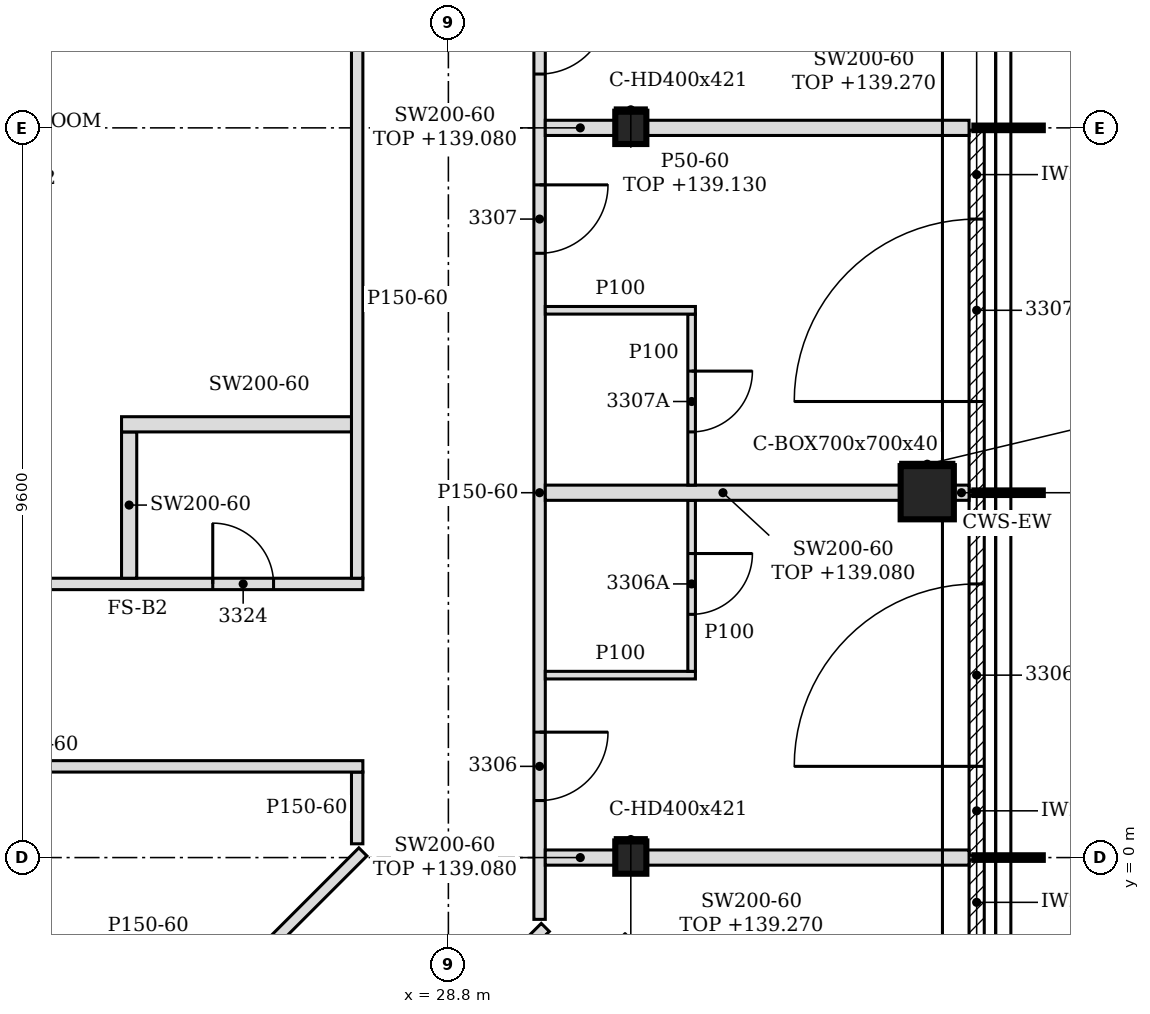
"""IFC4 building model, lengths in metres.
Left out: names, types, materials, properties, quantities, classifications, styles, units other than length and angle.
Written with IfcOpenShell. Run it as: python <this file> out.ifc"""

import sys

from ifc_helpers import new_model, si_unit, direction, frame, frame_2d, origin, origin_2d, place, context, subcontext, project, spatial, polyline, rectangle, hollow_rectangle, i_section, outline, extrude, element, fill, save


model = new_model("IFC4")
c1 = context("Model", 3, precision=1e-05, world=origin(), true_north=direction((0.0, 1.0)))
c2 = subcontext(c1, "Body", "Model", "MODEL_VIEW")
j1 = project(units=[si_unit("LENGTHUNIT", "METRE"), si_unit("PLANEANGLEUNIT", "RADIAN")], contexts=[c1])
p1 = place(None, origin())
s1 = spatial("IfcSite", under=j1, at=p1, CompositionType="ELEMENT")
p2 = place(p1, origin())
s2 = spatial("IfcBuilding", under=s1, at=p2, CompositionType="ELEMENT")
p3 = place(p2, frame((0.0, 0.0, 136.2)))
s3 = spatial("IfcBuildingStorey", under=s2, at=p3, CompositionType="ELEMENT", Elevation=136.2)
p4 = place(p3, frame((35.1, 4.8, -0.15), z_axis=(0.0, 0.0, 1.0), x_axis=(1.0, 0.0, 0.0)))
e1 = element("IfcColumn", 1, at=p4, inside=s3, PredefinedType="COLUMN", context=c2, shape_type="SweptSolid", body=[
    extrude(hollow_rectangle(XDim=0.7, YDim=0.7, WallThickness=0.04, at=origin_2d()), origin(), (0.0, 0.0, 1.0), 3.6),
])
for number, where, z_axis, x_axis in (
    (2, (31.2, 0.0, -0.15), (0.0, 0.0, 1.0), (1.0, 0.0, 0.0)),
    (3, (31.2, 9.6, -0.15), (0.0, 0.0, 1.0), (1.0, 0.0, 0.0)),
):
    element("IfcColumn", number, at=place(p3, frame(where, z_axis=z_axis, x_axis=x_axis)), inside=s3, PredefinedType="COLUMN", context=c2, shape_type="SweptSolid", body=[
        extrude(i_section(OverallWidth=0.409, OverallDepth=0.425, WebThickness=0.033, FlangeThickness=0.052, FilletRadius=0.015, at=origin_2d()), origin(), (0.0, 0.0, 1.0), 3.6),
    ])
p5 = place(p3, frame((35.75, -4.656, 0.0), z_axis=(0.0, 0.0, 1.0), x_axis=(0.0, 1.0, 0.0)))
e4 = element("IfcWall", 4, at=p5, inside=s3, PredefinedType="NOTDEFINED", context=c2, shape_type="SweptSolid", body=[
    extrude(rectangle(XDim=4.626, YDim=0.2, at=frame_2d((2.313, 0.0))), origin(), (0.0, 0.0, 1.0), 3.45),
])
p6 = place(p5, frame((1.108, 0.0, 0.0)))
e5 = element("IfcOpeningElement", 5, at=p6, cuts=e4, PredefinedType="OPENING", context=c2, shape_type="SweptSolid", body=[
    extrude(rectangle(XDim=2.4, YDim=2.4, at=frame_2d((1.2, 1.2))), frame((0.0, 0.11, 0.0), z_axis=(0.0, -1.0, 0.0), x_axis=(1.0, 0.0, 0.0)), (0.0, 0.0, 1.0), 0.22),
])
p7 = place(p3, frame((35.75, 0.03, 0.0), z_axis=(0.0, 0.0, 1.0), x_axis=(0.0, 1.0, 0.0)))
e6 = element("IfcWall", 6, at=p7, inside=s3, PredefinedType="NOTDEFINED", context=c2, shape_type="SweptSolid", body=[
    extrude(rectangle(XDim=4.74, YDim=0.2, at=frame_2d((2.37, 0.0))), origin(), (0.0, 0.0, 1.0), 3.45),
])
p8 = place(p7, frame((1.17, 0.0, 0.0)))
e7 = element("IfcOpeningElement", 7, at=p8, cuts=e6, PredefinedType="OPENING", context=c2, shape_type="SweptSolid", body=[
    extrude(rectangle(XDim=2.4, YDim=2.4, at=frame_2d((1.2, 1.2))), frame((0.0, 0.11, 0.0), z_axis=(0.0, -1.0, 0.0), x_axis=(1.0, 0.0, 0.0)), (0.0, 0.0, 1.0), 0.22),
])
p9 = place(p3, frame((35.75, 4.83, 0.0), z_axis=(0.0, 0.0, 1.0), x_axis=(0.0, 1.0, 0.0)))
e8 = element("IfcWall", 8, at=p9, inside=s3, PredefinedType="NOTDEFINED", context=c2, shape_type="SweptSolid", body=[
    extrude(rectangle(XDim=4.74, YDim=0.2, at=frame_2d((2.37, 0.0))), origin(), (0.0, 0.0, 1.0), 3.45),
])
p10 = place(p9, frame((1.17, 0.0, 0.0)))
e9 = element("IfcOpeningElement", 9, at=p10, cuts=e8, PredefinedType="OPENING", context=c2, shape_type="SweptSolid", body=[
    extrude(rectangle(XDim=2.4, YDim=2.4, at=frame_2d((1.2, 1.2))), frame((0.0, 0.11, 0.0), z_axis=(0.0, -1.0, 0.0), x_axis=(1.0, 0.0, 0.0)), (0.0, 0.0, 1.0), 0.22),
])
p11 = place(p3, frame((22.722, -8.272, 0.0), z_axis=(0.0, 0.0, 1.0), x_axis=(0.707106781187, 0.707106781187, 0.0)))
e10 = element("IfcWall", 10, at=p11, inside=s3, PredefinedType="PARTITIONING", context=c2, shape_type="SweptSolid", body=[
    extrude(rectangle(XDim=10.399, YDim=0.15, at=frame_2d((5.199, 0.0))), origin(), (0.0, 0.0, 1.0), 2.88),
])
p12 = place(p11, frame((1.925, 0.0, 0.0)))
e11 = element("IfcOpeningElement", 11, at=p12, cuts=e10, PredefinedType="OPENING", context=c2, shape_type="SweptSolid", body=[
    extrude(rectangle(XDim=0.9, YDim=2.1, at=frame_2d((0.45, 1.05))), frame((0.0, 0.085, 0.0), z_axis=(0.0, -1.0, 0.0), x_axis=(1.0, 0.0, 0.0)), (0.0, 0.0, 1.0), 0.17),
])
p13 = place(p11, frame((5.963, 0.0, 0.0)))
e12 = element("IfcOpeningElement", 12, at=p13, cuts=e10, PredefinedType="OPENING", context=c2, shape_type="SweptSolid", body=[
    extrude(rectangle(XDim=0.9, YDim=2.1, at=frame_2d((0.45, 1.05))), frame((0.0, 0.085, 0.0), z_axis=(0.0, -1.0, 0.0), x_axis=(1.0, 0.0, 0.0)), (0.0, 0.0, 1.0), 0.17),
])
p14 = place(p3, frame((19.408, -8.191, 0.0), z_axis=(0.0, 0.0, 1.0), x_axis=(0.707117222888, 0.707096339331, 0.0)))
e13 = element("IfcWall", 13, at=p14, inside=s3, PredefinedType="PARTITIONING", context=c2, shape_type="SweptSolid", body=[
    extrude(rectangle(XDim=11.691, YDim=0.15, at=frame_2d((5.845, 0.0))), origin(), (0.0, 0.0, 1.0), 2.88),
])
p15 = place(p14, frame((5.195, 0.0, 0.0)))
e14 = element("IfcOpeningElement", 14, at=p15, cuts=e13, PredefinedType="OPENING", context=c2, shape_type="SweptSolid", body=[
    extrude(rectangle(XDim=0.9, YDim=2.1, at=frame_2d((0.45, 1.05))), frame((0.0, 0.085, 0.0), z_axis=(0.0, -1.0, 0.0), x_axis=(1.0, 0.0, 0.0)), (0.0, 0.0, 1.0), 0.17),
])
p16 = place(p3, frame((30.0, -0.813, 0.0), z_axis=(0.0, 0.0, 1.0), x_axis=(0.0, 1.0, 0.0)))
e15 = element("IfcWall", 15, at=p16, inside=s3, PredefinedType="PARTITIONING", context=c2, shape_type="SweptSolid", body=[
    extrude(outline(polyline([(0.0, 0.0), (12.834, 0.0), (12.834, 3.45), (10.518, 3.45), (10.516, 2.88), (10.308, 2.88), (10.306, 3.45), (5.718, 3.45), (5.716, 2.88), (5.508, 2.88), (5.506, 3.45), (0.918, 3.45), (0.916, 2.88), (0.708, 2.88), (0.706, 3.45), (0.0, 3.45), (0.0, 0.0)])), frame((0.0, 0.075, 0.0), z_axis=(0.0, -1.0, 0.0), x_axis=(1.0, 0.0, 0.0)), (0.0, 0.0, 1.0), 0.15),
])
p17 = place(p16, frame((1.563, 0.0, 0.0)))
e16 = element("IfcOpeningElement", 16, at=p17, cuts=e15, PredefinedType="OPENING", context=c2, shape_type="SweptSolid", body=[
    extrude(rectangle(XDim=0.9, YDim=2.1, at=frame_2d((0.45, 1.05))), frame((0.0, 0.085, 0.0), z_axis=(0.0, -1.0, 0.0), x_axis=(1.0, 0.0, 0.0)), (0.0, 0.0, 1.0), 0.17),
])
p18 = place(p16, frame((8.763, 0.0, 0.0)))
e17 = element("IfcOpeningElement", 17, at=p18, cuts=e15, PredefinedType="OPENING", context=c2, shape_type="SweptSolid", body=[
    extrude(rectangle(XDim=0.9, YDim=2.1, at=frame_2d((0.45, 1.05))), frame((0.0, 0.085, 0.0), z_axis=(0.0, -1.0, 0.0), x_axis=(1.0, 0.0, 0.0)), (0.0, 0.0, 1.0), 0.17),
])
p19 = place(p16, frame((11.121, 0.0, 0.0)))
e18 = element("IfcOpeningElement", 18, at=p19, cuts=e15, PredefinedType="OPENING", context=c2, shape_type="SweptSolid", body=[
    extrude(rectangle(XDim=0.9, YDim=2.1, at=frame_2d((0.45, 1.05))), frame((0.0, 0.085, 0.0), z_axis=(0.0, -1.0, 0.0), x_axis=(1.0, 0.0, 0.0)), (0.0, 0.0, 1.0), 0.17),
])
p20 = place(p3, frame((30.075, 0.0, 0.0), z_axis=(0.0, 0.0, 1.0), x_axis=(1.0, 0.0, 0.0)))
e19 = element("IfcWall", 19, at=p20, inside=s3, PredefinedType="PARTITIONING", context=c2, shape_type="SweptSolid", body=[
    extrude(rectangle(XDim=0.921, YDim=0.2, at=frame_2d((0.46, 0.0))), origin(), (0.0, 0.0, 1.0), 2.88),
])
p21 = place(p3, frame((31.405, 0.0, 0.0), z_axis=(0.0, 0.0, 1.0), x_axis=(1.0, 0.0, 0.0)))
e20 = element("IfcWall", 20, at=p21, inside=s3, PredefinedType="PARTITIONING", context=c2, shape_type="SweptSolid", body=[
    extrude(outline(polyline([(0.0, 0.0), (4.245, 0.0), (4.246, 3.07), (3.845, 3.07), (3.844, 2.93), (3.545, 2.93), (3.543, 3.07), (0.0, 3.07), (0.0, 0.0)])), frame((0.0, 0.1, 0.0), z_axis=(0.0, -1.0, 0.0), x_axis=(1.0, 0.0, 0.0)), (0.0, 0.0, 1.0), 0.2),
])
p22 = place(p3, frame((27.6, 0.181, 0.0), z_axis=(0.0, 0.0, 1.0), x_axis=(0.0, 1.0, 0.0)))
e21 = element("IfcWall", 21, at=p22, inside=s3, PredefinedType="PARTITIONING", context=c2, shape_type="SweptSolid", body=[
    extrude(rectangle(XDim=0.944, YDim=0.15, at=frame_2d((0.472, 0.0))), origin(), (0.0, 0.0, 1.0), 3.45),
])
p23 = place(p3, frame((19.125, 1.2, 0.0), z_axis=(0.0, 0.0, 1.0), x_axis=(1.0, 0.0, 0.0)))
e22 = element("IfcWall", 22, at=p23, inside=s3, PredefinedType="PARTITIONING", context=c2, shape_type="SweptSolid", body=[
    extrude(outline(polyline([(0.0, 0.0), (8.55, 0.0), (8.55, 3.45), (0.225, 3.45), (0.223, 2.83), (0.0, 2.83), (0.0, 0.0)])), frame((0.0, 0.075, 0.0), z_axis=(0.0, -1.0, 0.0), x_axis=(1.0, 0.0, 0.0)), (0.0, 0.0, 1.0), 0.15),
])
p24 = place(p3, frame((30.075, 2.4, 0.0), z_axis=(0.0, 0.0, 1.0), x_axis=(1.0, 0.0, 0.0)))
e23 = element("IfcWall", 23, at=p24, inside=s3, PredefinedType="PARTITIONING", context=c2, shape_type="SweptSolid", body=[
    extrude(outline(polyline([(0.0, 0.0), (1.975, 0.0), (1.975, 3.45), (1.275, 3.45), (1.273, 2.93), (0.975, 2.93), (0.973, 3.45), (0.0, 3.45), (0.0, 0.0)])), frame((0.0, 0.05, 0.0), z_axis=(0.0, -1.0, 0.0), x_axis=(1.0, 0.0, 0.0)), (0.0, 0.0, 1.0), 0.1),
])
p25 = place(p3, frame((32.0, 2.45, 0.0), z_axis=(0.0, 0.0, 1.0), x_axis=(0.0, 1.0, 0.0)))
e24 = element("IfcWall", 24, at=p25, inside=s3, PredefinedType="PARTITIONING", context=c2, shape_type="SweptSolid", body=[
    extrude(rectangle(XDim=2.25, YDim=0.1, at=frame_2d((1.125, 0.0))), origin(), (0.0, 0.0, 1.0), 3.45),
])
p26 = place(p25, frame((0.75, 0.0, 0.0)))
e25 = element("IfcOpeningElement", 25, at=p26, cuts=e24, PredefinedType="OPENING", context=c2, shape_type="SweptSolid", body=[
    extrude(rectangle(XDim=0.8, YDim=2.1, at=frame_2d((0.4, 1.05))), frame((0.0, 0.06, 0.0), z_axis=(0.0, -1.0, 0.0), x_axis=(1.0, 0.0, 0.0)), (0.0, 0.0, 1.0), 0.12),
])
p27 = place(p3, frame((19.125, 3.6, 0.0), z_axis=(0.0, 0.0, 1.0), x_axis=(1.0, 0.0, 0.0)))
e26 = element("IfcWall", 26, at=p27, inside=s3, PredefinedType="PARTITIONING", context=c2, shape_type="SweptSolid", body=[
    extrude(outline(polyline([(0.0, 0.0), (8.55, 0.0), (8.55, 3.45), (0.225, 3.45), (0.223, 2.83), (0.0, 2.83), (0.0, 0.0)])), frame((0.0, 0.075, 0.0), z_axis=(0.0, -1.0, 0.0), x_axis=(1.0, 0.0, 0.0)), (0.0, 0.0, 1.0), 0.15),
])
p28 = place(p27, frame((6.575, 0.0, 0.0)))
e27 = element("IfcOpeningElement", 27, at=p28, cuts=e26, PredefinedType="OPENING", context=c2, shape_type="SweptSolid", body=[
    extrude(rectangle(XDim=0.8, YDim=2.1, at=frame_2d((0.4, 1.05))), frame((0.0, 0.085, 0.0), z_axis=(0.0, -1.0, 0.0), x_axis=(1.0, 0.0, 0.0)), (0.0, 0.0, 1.0), 0.17),
])
p29 = place(p3, frame((24.6, 3.675, 0.0), z_axis=(0.0, 0.0, 1.0), x_axis=(0.0, 1.0, 0.0)))
e28 = element("IfcWall", 28, at=p29, inside=s3, PredefinedType="PARTITIONING", context=c2, shape_type="SweptSolid", body=[
    extrude(outline(polyline([(0.0, 0.0), (1.925, 0.0), (1.925, 3.45), (1.23, 3.45), (1.228, 2.88), (1.02, 2.88), (1.018, 3.45), (0.0, 3.45), (0.0, 0.0)])), frame((0.0, 0.1, 0.0), z_axis=(0.0, -1.0, 0.0), x_axis=(1.0, 0.0, 0.0)), (0.0, 0.0, 1.0), 0.2),
])
p30 = place(p3, frame((27.6, 3.675, 0.0), z_axis=(0.0, 0.0, 1.0), x_axis=(0.0, 1.0, 0.0)))
e29 = element("IfcWall", 29, at=p30, inside=s3, PredefinedType="PARTITIONING", context=c2, shape_type="SweptSolid", body=[
    extrude(outline(polyline([(0.0, 0.0), (7.352, 0.0), (7.352, 3.45), (6.03, 3.45), (6.028, 2.88), (5.82, 2.88), (5.818, 3.45), (1.23, 3.45), (1.228, 2.88), (1.02, 2.88), (1.018, 3.45), (0.0, 3.45), (0.0, 0.0)])), frame((0.0, 0.075, 0.0), z_axis=(0.0, -1.0, 0.0), x_axis=(1.0, 0.0, 0.0)), (0.0, 0.0, 1.0), 0.15),
])
p31 = place(p3, frame((30.075, 4.8, 0.0), z_axis=(0.0, 0.0, 1.0), x_axis=(1.0, 0.0, 0.0)))
e30 = element("IfcWall", 30, at=p31, inside=s3, PredefinedType="PARTITIONING", context=c2, shape_type="SweptSolid", body=[
    extrude(rectangle(XDim=4.675, YDim=0.2, at=frame_2d((2.337, 0.0))), origin(), (0.0, 0.0, 1.0), 2.88),
])
p32 = place(p3, frame((35.45, 4.8, 0.0), z_axis=(0.0, 0.0, 1.0), x_axis=(1.0, 0.0, 0.0)))
e31 = element("IfcWall", 31, at=p32, inside=s3, PredefinedType="PARTITIONING", context=c2, shape_type="SweptSolid", body=[
    extrude(rectangle(XDim=0.2, YDim=0.2, at=frame_2d((0.1, 0.0))), origin(), (0.0, 0.0, 1.0), 3.45),
])
p33 = place(p3, frame((32.0, 4.9, 0.0), z_axis=(0.0, 0.0, 1.0), x_axis=(0.0, 1.0, 0.0)))
e32 = element("IfcWall", 32, at=p33, inside=s3, PredefinedType="PARTITIONING", context=c2, shape_type="SweptSolid", body=[
    extrude(rectangle(XDim=2.25, YDim=0.1, at=frame_2d((1.125, 0.0))), origin(), (0.0, 0.0, 1.0), 3.45),
])
p34 = place(p33, frame((0.7, 0.0, 0.0)))
e33 = element("IfcOpeningElement", 33, at=p34, cuts=e32, PredefinedType="OPENING", context=c2, shape_type="SweptSolid", body=[
    extrude(rectangle(XDim=0.8, YDim=2.1, at=frame_2d((0.4, 1.05))), frame((0.0, 0.06, 0.0), z_axis=(0.0, -1.0, 0.0), x_axis=(1.0, 0.0, 0.0)), (0.0, 0.0, 1.0), 0.12),
])
p35 = place(p3, frame((24.5, 5.7, 0.0), z_axis=(0.0, 0.0, 1.0), x_axis=(1.0, 0.0, 0.0)))
e34 = element("IfcWall", 34, at=p35, inside=s3, PredefinedType="PARTITIONING", context=c2, shape_type="SweptSolid", body=[
    extrude(rectangle(XDim=3.025, YDim=0.2, at=frame_2d((1.512, 0.0))), origin(), (0.0, 0.0, 1.0), 3.45),
])
p36 = place(p3, frame((30.075, 7.2, 0.0), z_axis=(0.0, 0.0, 1.0), x_axis=(1.0, 0.0, 0.0)))
e35 = element("IfcWall", 35, at=p36, inside=s3, PredefinedType="PARTITIONING", context=c2, shape_type="SweptSolid", body=[
    extrude(outline(polyline([(0.0, 0.0), (1.975, 0.0), (1.975, 3.45), (1.275, 3.45), (1.273, 2.93), (0.975, 2.93), (0.973, 3.45), (0.0, 3.45), (0.0, 0.0)])), frame((0.0, 0.05, 0.0), z_axis=(0.0, -1.0, 0.0), x_axis=(1.0, 0.0, 0.0)), (0.0, 0.0, 1.0), 0.1),
])
p37 = place(p3, frame((30.075, 9.6, 0.0), z_axis=(0.0, 0.0, 1.0), x_axis=(1.0, 0.0, 0.0)))
e36 = element("IfcWall", 36, at=p37, inside=s3, PredefinedType="PARTITIONING", context=c2, shape_type="SweptSolid", body=[
    extrude(rectangle(XDim=0.921, YDim=0.2, at=frame_2d((0.46, 0.0))), origin(), (0.0, 0.0, 1.0), 2.88),
])
p38 = place(p3, frame((31.405, 9.6, 0.0), z_axis=(0.0, 0.0, 1.0), x_axis=(1.0, 0.0, 0.0)))
e37 = element("IfcWall", 37, at=p38, inside=s3, PredefinedType="PARTITIONING", context=c2, shape_type="SweptSolid", body=[
    extrude(outline(polyline([(0.0, 0.0), (4.245, 0.0), (4.246, 3.07), (3.845, 3.07), (3.844, 2.93), (3.545, 2.93), (3.543, 3.07), (0.0, 3.07), (0.0, 0.0)])), frame((0.0, 0.1, 0.0), z_axis=(0.0, -1.0, 0.0), x_axis=(1.0, 0.0, 0.0)), (0.0, 0.0, 1.0), 0.2),
])
p39 = place(p3, frame((30.996, 0.238, 0.0), z_axis=(0.0, 0.0, 1.0), x_axis=(1.0, 0.0, 0.0)))
e38 = element("IfcWall", 38, at=p39, inside=s3, PredefinedType="PARTITIONING", context=c2, shape_type="SweptSolid", body=[
    extrude(rectangle(XDim=0.409, YDim=0.05, at=frame_2d((0.205, 0.0))), origin(), (0.0, 0.0, 1.0), 2.93),
])
p40 = place(p3, frame((34.75, 5.175, 0.0), z_axis=(0.0, 0.0, 1.0), x_axis=(1.0, 0.0, 0.0)))
e39 = element("IfcWall", 39, at=p40, inside=s3, PredefinedType="PARTITIONING", context=c2, shape_type="SweptSolid", body=[
    extrude(rectangle(XDim=0.7, YDim=0.05, at=frame_2d((0.35, 0.0))), origin(), (0.0, 0.0, 1.0), 2.93),
])
p41 = place(p3, frame((30.996, 9.837, 0.0), z_axis=(0.0, 0.0, 1.0), x_axis=(1.0, 0.0, 0.0)))
e40 = element("IfcWall", 40, at=p41, inside=s3, PredefinedType="PARTITIONING", context=c2, shape_type="SweptSolid", body=[
    extrude(rectangle(XDim=0.409, YDim=0.05, at=frame_2d((0.205, 0.0))), origin(), (0.0, 0.0, 1.0), 2.93),
])
p42 = place(p8, origin())
e41 = element("IfcDoor", 41, at=p42, inside=s3, OperationType="SINGLE_SWING_LEFT", PredefinedType="DOOR", context=c2, shape_type="SweptSolid", body=[
    extrude(rectangle(XDim=2.4, YDim=2.4, at=frame_2d((1.2, 1.2))), frame((0.0, 0.025, 0.0), z_axis=(0.0, -1.0, 0.0), x_axis=(1.0, 0.0, 0.0)), (0.0, 0.0, 1.0), 0.05),
])
fill(e7, e41)
p43 = place(p10, origin())
e42 = element("IfcDoor", 42, at=p43, inside=s3, OperationType="SINGLE_SWING_LEFT", PredefinedType="DOOR", context=c2, shape_type="SweptSolid", body=[
    extrude(rectangle(XDim=2.4, YDim=2.4, at=frame_2d((1.2, 1.2))), frame((0.0, 0.025, 0.0), z_axis=(0.0, -1.0, 0.0), x_axis=(1.0, 0.0, 0.0)), (0.0, 0.0, 1.0), 0.05),
])
fill(e9, e42)
p44 = place(p17, frame((0.9, 0.0, 0.0), z_axis=(0.0, 0.0, 1.0), x_axis=(-1.0, 0.0, 0.0)))
e43 = element("IfcDoor", 43, at=p44, inside=s3, OperationType="SINGLE_SWING_LEFT", PredefinedType="DOOR", context=c2, shape_type="SweptSolid", body=[
    extrude(rectangle(XDim=0.9, YDim=2.1, at=frame_2d((0.45, 1.05))), frame((0.0, 0.025, 0.0), z_axis=(0.0, -1.0, 0.0), x_axis=(1.0, 0.0, 0.0)), (0.0, 0.0, 1.0), 0.05),
])
fill(e16, e43)
p45 = place(p26, frame((0.8, 0.0, 0.0), z_axis=(0.0, 0.0, 1.0), x_axis=(-1.0, 0.0, 0.0)))
e44 = element("IfcDoor", 44, at=p45, inside=s3, OperationType="SINGLE_SWING_LEFT", PredefinedType="DOOR", context=c2, shape_type="SweptSolid", body=[
    extrude(rectangle(XDim=0.8, YDim=2.1, at=frame_2d((0.4, 1.05))), frame((0.0, 0.025, 0.0), z_axis=(0.0, -1.0, 0.0), x_axis=(1.0, 0.0, 0.0)), (0.0, 0.0, 1.0), 0.05),
])
fill(e25, e44)
p46 = place(p18, frame((0.9, 0.0, 0.0), z_axis=(0.0, 0.0, 1.0), x_axis=(-1.0, 0.0, 0.0)))
e45 = element("IfcDoor", 45, at=p46, inside=s3, OperationType="SINGLE_SWING_LEFT", PredefinedType="DOOR", context=c2, shape_type="SweptSolid", body=[
    extrude(rectangle(XDim=0.9, YDim=2.1, at=frame_2d((0.45, 1.05))), frame((0.0, 0.025, 0.0), z_axis=(0.0, -1.0, 0.0), x_axis=(1.0, 0.0, 0.0)), (0.0, 0.0, 1.0), 0.05),
])
fill(e17, e45)
p47 = place(p34, frame((0.8, 0.0, 0.0), z_axis=(0.0, 0.0, 1.0), x_axis=(-1.0, 0.0, 0.0)))
e46 = element("IfcDoor", 46, at=p47, inside=s3, OperationType="SINGLE_SWING_LEFT", PredefinedType="DOOR", context=c2, shape_type="SweptSolid", body=[
    extrude(rectangle(XDim=0.8, YDim=2.1, at=frame_2d((0.4, 1.05))), frame((0.0, 0.025, 0.0), z_axis=(0.0, -1.0, 0.0), x_axis=(1.0, 0.0, 0.0)), (0.0, 0.0, 1.0), 0.05),
])
fill(e33, e46)
p48 = place(p19, frame((0.9, 0.0, 0.0), z_axis=(0.0, 0.0, 1.0), x_axis=(-1.0, 0.0, 0.0)))
e47 = element("IfcDoor", 47, at=p48, inside=s3, OperationType="SINGLE_SWING_LEFT", PredefinedType="DOOR", context=c2, shape_type="SweptSolid", body=[
    extrude(rectangle(XDim=0.9, YDim=2.1, at=frame_2d((0.45, 1.05))), frame((0.0, 0.025, 0.0), z_axis=(0.0, -1.0, 0.0), x_axis=(1.0, 0.0, 0.0)), (0.0, 0.0, 1.0), 0.05),
])
fill(e18, e47)
p49 = place(p28, origin())
e48 = element("IfcDoor", 48, at=p49, inside=s3, OperationType="SINGLE_SWING_LEFT", PredefinedType="DOOR", context=c2, shape_type="SweptSolid", body=[
    extrude(rectangle(XDim=0.8, YDim=2.1, at=frame_2d((0.4, 1.05))), frame((0.0, 0.025, 0.0), z_axis=(0.0, -1.0, 0.0), x_axis=(1.0, 0.0, 0.0)), (0.0, 0.0, 1.0), 0.05),
])
fill(e27, e48)
save(model, sys.argv[1])
